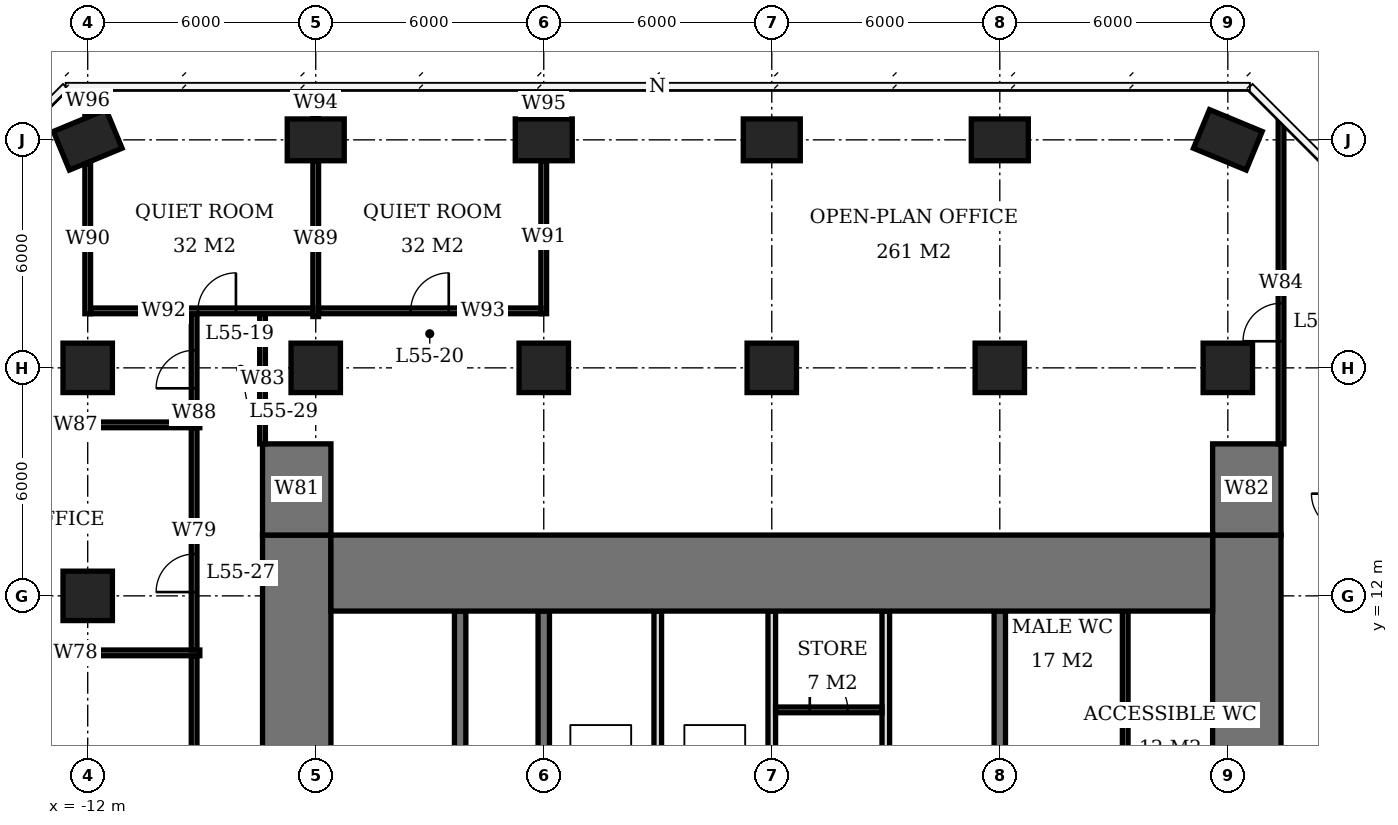
"""IFC4 building model, lengths in metres.
Left out: names, types, materials, properties, quantities, classifications, styles, units other than length and angle.
Written with IfcOpenShell. Run it as: python <this file> out.ifc"""

import sys

from ifc_helpers import new_model, si_unit, direction, frame, frame_2d, origin, origin_2d, place, context, subcontext, project, spatial, rectangle, extrude, element, fill, save


model = new_model("IFC4")
c1 = context("Model", 3, precision=1e-05, world=origin(), true_north=direction((0.0, 1.0)))
c2 = subcontext(c1, "Body", "Model", "MODEL_VIEW")
j1 = project(units=[si_unit("LENGTHUNIT", "METRE"), si_unit("PLANEANGLEUNIT", "RADIAN")], contexts=[c1])
p1 = place(None, origin())
s1 = spatial("IfcSite", under=j1, at=p1, CompositionType="ELEMENT")
p2 = place(p1, origin())
s2 = spatial("IfcBuilding", under=s1, at=p2, CompositionType="ELEMENT")
p3 = place(p2, frame((0.0, 0.0, 224.0)))
s3 = spatial("IfcBuildingStorey", under=s2, at=p3, CompositionType="ELEMENT", Elevation=224.0)
for number, where, z_axis, x_axis in (
    (1, (-12.0, 12.0, 0.0), (0.0, 0.0, 1.0), (1.0, 0.0, 0.0)),
    (2, (-12.0, 18.0, 0.0), (0.0, 0.0, 1.0), (1.0, 0.0, 0.0)),
):
    element("IfcColumn", number, at=place(p3, frame(where, z_axis=z_axis, x_axis=x_axis)), inside=s3, PredefinedType="COLUMN", context=c2, shape_type="SweptSolid", body=[
        extrude(rectangle(XDim=1.3, YDim=1.3, at=origin_2d()), origin(), (0.0, 0.0, 1.0), 3.9),
    ])
p4 = place(p3, frame((-12.0, 24.0, 0.0), z_axis=(0.0, 0.0, 1.0), x_axis=(0.923879532511, 0.382683432365, 0.0)))
e3 = element("IfcColumn", 3, at=p4, inside=s3, PredefinedType="COLUMN", context=c2, shape_type="SweptSolid", body=[
    extrude(rectangle(XDim=1.5, YDim=1.1, at=origin_2d()), origin(), (0.0, 0.0, 1.0), 3.9),
])
p5 = place(p3, frame((-6.0, 18.0, 0.0), z_axis=(0.0, 0.0, 1.0), x_axis=(1.0, 0.0, 0.0)))
e4 = element("IfcColumn", 4, at=p5, inside=s3, PredefinedType="COLUMN", context=c2, shape_type="SweptSolid", body=[
    extrude(rectangle(XDim=1.3, YDim=1.3, at=origin_2d()), origin(), (0.0, 0.0, 1.0), 3.9),
])
p6 = place(p3, frame((-6.0, 24.0, 0.0), z_axis=(0.0, 0.0, 1.0), x_axis=(1.0, 0.0, 0.0)))
e5 = element("IfcColumn", 5, at=p6, inside=s3, PredefinedType="COLUMN", context=c2, shape_type="SweptSolid", body=[
    extrude(rectangle(XDim=1.5, YDim=1.1, at=origin_2d()), origin(), (0.0, 0.0, 1.0), 3.9),
])
p7 = place(p3, frame((0.0, 18.0, 0.0), z_axis=(0.0, 0.0, 1.0), x_axis=(1.0, 0.0, 0.0)))
e6 = element("IfcColumn", 6, at=p7, inside=s3, PredefinedType="COLUMN", context=c2, shape_type="SweptSolid", body=[
    extrude(rectangle(XDim=1.3, YDim=1.3, at=origin_2d()), origin(), (0.0, 0.0, 1.0), 3.9),
])
p8 = place(p3, frame((0.0, 24.0, 0.0), z_axis=(0.0, 0.0, 1.0), x_axis=(1.0, 0.0, 0.0)))
e7 = element("IfcColumn", 7, at=p8, inside=s3, PredefinedType="COLUMN", context=c2, shape_type="SweptSolid", body=[
    extrude(rectangle(XDim=1.5, YDim=1.1, at=origin_2d()), origin(), (0.0, 0.0, 1.0), 3.9),
])
p9 = place(p3, frame((6.0, 18.0, 0.0), z_axis=(0.0, 0.0, 1.0), x_axis=(1.0, 0.0, 0.0)))
e8 = element("IfcColumn", 8, at=p9, inside=s3, PredefinedType="COLUMN", context=c2, shape_type="SweptSolid", body=[
    extrude(rectangle(XDim=1.3, YDim=1.3, at=origin_2d()), origin(), (0.0, 0.0, 1.0), 3.9),
])
p10 = place(p3, frame((6.0, 24.0, 0.0), z_axis=(0.0, 0.0, 1.0), x_axis=(1.0, 0.0, 0.0)))
e9 = element("IfcColumn", 9, at=p10, inside=s3, PredefinedType="COLUMN", context=c2, shape_type="SweptSolid", body=[
    extrude(rectangle(XDim=1.5, YDim=1.1, at=origin_2d()), origin(), (0.0, 0.0, 1.0), 3.9),
])
p11 = place(p3, frame((12.0, 18.0, 0.0), z_axis=(0.0, 0.0, 1.0), x_axis=(1.0, 0.0, 0.0)))
e10 = element("IfcColumn", 10, at=p11, inside=s3, PredefinedType="COLUMN", context=c2, shape_type="SweptSolid", body=[
    extrude(rectangle(XDim=1.3, YDim=1.3, at=origin_2d()), origin(), (0.0, 0.0, 1.0), 3.9),
])
p12 = place(p3, frame((12.0, 24.0, 0.0), z_axis=(0.0, 0.0, 1.0), x_axis=(1.0, 0.0, 0.0)))
e11 = element("IfcColumn", 11, at=p12, inside=s3, PredefinedType="COLUMN", context=c2, shape_type="SweptSolid", body=[
    extrude(rectangle(XDim=1.5, YDim=1.1, at=origin_2d()), origin(), (0.0, 0.0, 1.0), 3.9),
])
p13 = place(p3, frame((18.0, 18.0, 0.0), z_axis=(0.0, 0.0, 1.0), x_axis=(1.0, 0.0, 0.0)))
e12 = element("IfcColumn", 12, at=p13, inside=s3, PredefinedType="COLUMN", context=c2, shape_type="SweptSolid", body=[
    extrude(rectangle(XDim=1.3, YDim=1.3, at=origin_2d()), origin(), (0.0, 0.0, 1.0), 3.9),
])
p14 = place(p3, frame((18.0, 24.0, 0.0), z_axis=(0.0, 0.0, 1.0), x_axis=(0.923879532511, -0.382683432365, 0.0)))
e13 = element("IfcColumn", 13, at=p14, inside=s3, PredefinedType="COLUMN", context=c2, shape_type="SweptSolid", body=[
    extrude(rectangle(XDim=1.5, YDim=1.1, at=origin_2d()), origin(), (0.0, 0.0, 1.0), 3.9),
])
p15 = place(p3, frame((-5.6, 12.6, 0.0), z_axis=(0.0, 0.0, 1.0), x_axis=(1.0, 0.0, 0.0)))
e14 = element("IfcWall", 14, at=p15, inside=s3, PredefinedType="SHEAR", context=c2, shape_type="SweptSolid", body=[
    extrude(rectangle(XDim=23.2, YDim=2.0, at=frame_2d((11.6, 0.0))), origin(), (0.0, 0.0, 1.0), 3.9),
])
p16 = place(p3, frame((-6.5, -7.6, 0.0), z_axis=(0.0, 0.0, 1.0), x_axis=(0.0, 1.0, 0.0)))
e15 = element("IfcWall", 15, at=p16, inside=s3, PredefinedType="SHEAR", context=c2, shape_type="SweptSolid", body=[
    extrude(rectangle(XDim=21.2, YDim=1.8, at=frame_2d((10.6, 0.0))), origin(), (0.0, 0.0, 1.0), 3.9),
])
p17 = place(p16, frame((7.8, 0.0, 0.0)))
e16 = element("IfcOpeningElement", 16, at=p17, cuts=e15, PredefinedType="OPENING", context=c2, shape_type="SweptSolid", body=[
    extrude(rectangle(XDim=1.8, YDim=2.4, at=frame_2d((0.9, 1.2))), frame((0.0, 0.91, 0.0), z_axis=(0.0, -1.0, 0.0), x_axis=(1.0, 0.0, 0.0)), (0.0, 0.0, 1.0), 1.82),
])
p18 = place(p3, frame((18.5, -7.6, 0.0), z_axis=(0.0, 0.0, 1.0), x_axis=(0.0, 1.0, 0.0)))
e17 = element("IfcWall", 17, at=p18, inside=s3, PredefinedType="SHEAR", context=c2, shape_type="SweptSolid", body=[
    extrude(rectangle(XDim=21.2, YDim=1.8, at=frame_2d((10.6, 0.0))), origin(), (0.0, 0.0, 1.0), 3.9),
])
p19 = place(p18, frame((9.2, 0.0, 0.0)))
e18 = element("IfcOpeningElement", 18, at=p19, cuts=e17, PredefinedType="OPENING", context=c2, shape_type="SweptSolid", body=[
    extrude(rectangle(XDim=1.8, YDim=2.4, at=frame_2d((0.9, 1.2))), frame((0.0, 0.91, 0.0), z_axis=(0.0, -1.0, 0.0), x_axis=(1.0, 0.0, 0.0)), (0.0, 0.0, 1.0), 1.82),
])
for number, where, z_axis, x_axis in (
    (19, (-6.5, 13.6, 0.0), (0.0, 0.0, 1.0), (0.0, 1.0, 0.0)),
    (20, (18.5, 13.6, 0.0), (0.0, 0.0, 1.0), (0.0, 1.0, 0.0)),
):
    element("IfcWall", number, at=place(p3, frame(where, z_axis=z_axis, x_axis=x_axis)), inside=s3, PredefinedType="SHEAR", context=c2, shape_type="SweptSolid", body=[
        extrude(rectangle(XDim=2.4, YDim=1.8, at=frame_2d((1.2, 0.0))), origin(), (0.0, 0.0, 1.0), 3.9),
    ])
p20 = place(p3, frame((0.0, 3.15, 0.0), z_axis=(0.0, 0.0, 1.0), x_axis=(0.0, 1.0, 0.0)))
e21 = element("IfcWall", 21, at=p20, inside=s3, PredefinedType="SHEAR", context=c2, shape_type="SweptSolid", body=[
    extrude(rectangle(XDim=8.45, YDim=0.3, at=frame_2d((4.225, 0.0))), origin(), (0.0, 0.0, 1.0), 3.9),
])
p21 = place(p3, frame((12.0, 6.15, 0.0), z_axis=(0.0, 0.0, 1.0), x_axis=(0.0, 1.0, 0.0)))
e22 = element("IfcWall", 22, at=p21, inside=s3, PredefinedType="SHEAR", context=c2, shape_type="SweptSolid", body=[
    extrude(rectangle(XDim=5.45, YDim=0.3, at=frame_2d((2.725, 0.0))), origin(), (0.0, 0.0, 1.0), 3.9),
])
p22 = place(p3, frame((-2.2, 3.15, 0.0), z_axis=(0.0, 0.0, 1.0), x_axis=(0.0, 1.0, 0.0)))
e23 = element("IfcWall", 23, at=p22, inside=s3, PredefinedType="SHEAR", context=c2, shape_type="SweptSolid", body=[
    extrude(rectangle(XDim=8.45, YDim=0.3, at=frame_2d((4.225, 0.0))), origin(), (0.0, 0.0, 1.0), 3.9),
])
for number, where, z_axis, x_axis in (
    (24, (3.0, 6.15, 0.0), (0.0, 0.0, 1.0), (0.0, 1.0, 0.0)),
    (25, (6.0, 6.15, 0.0), (0.0, 0.0, 1.0), (0.0, 1.0, 0.0)),
    (26, (9.0, 6.15, 0.0), (0.0, 0.0, 1.0), (0.0, 1.0, 0.0)),
):
    element("IfcWall", number, at=place(p3, frame(where, z_axis=z_axis, x_axis=x_axis)), inside=s3, PredefinedType="SOLIDWALL", context=c2, shape_type="SweptSolid", body=[
        extrude(rectangle(XDim=5.45, YDim=0.2, at=frame_2d((2.725, 0.0))), origin(), (0.0, 0.0, 1.0), 3.9),
    ])
p23 = place(p3, frame((15.3, 6.15, 0.0), z_axis=(0.0, 0.0, 1.0), x_axis=(0.0, 1.0, 0.0)))
e27 = element("IfcWall", 27, at=p23, inside=s3, PredefinedType="PLUMBINGWALL", context=c2, shape_type="SweptSolid", body=[
    extrude(rectangle(XDim=5.45, YDim=0.15, at=frame_2d((2.725, 0.0))), origin(), (0.0, 0.0, 1.0), 3.65),
])
p24 = place(p3, frame((6.1, 9.0, 0.0), z_axis=(0.0, 0.0, 1.0), x_axis=(1.0, 0.0, 0.0)))
e28 = element("IfcWall", 28, at=p24, inside=s3, PredefinedType="PARTITIONING", context=c2, shape_type="SweptSolid", body=[
    extrude(rectangle(XDim=2.8, YDim=0.15, at=frame_2d((1.4, 0.0))), origin(), (0.0, 0.0, 1.0), 3.65),
])
p25 = place(p24, frame((0.9, 0.0, 0.0)))
e29 = element("IfcOpeningElement", 29, at=p25, cuts=e28, PredefinedType="OPENING", context=c2, shape_type="SweptSolid", body=[
    extrude(rectangle(XDim=1.0, YDim=2.1, at=frame_2d((0.5, 1.05))), frame((0.0, 0.085, 0.0), z_axis=(0.0, -1.0, 0.0), x_axis=(1.0, 0.0, 0.0)), (0.0, 0.0, 1.0), 0.17),
])
p26 = place(p3, frame((-11.925, 19.5, 0.0), z_axis=(0.0, 0.0, 1.0), x_axis=(1.0, 0.0, 0.0)))
e30 = element("IfcWall", 30, at=p26, inside=s3, PredefinedType="PARTITIONING", context=c2, shape_type="SweptSolid", body=[
    extrude(rectangle(XDim=5.85, YDim=0.15, at=frame_2d((2.925, 0.0))), origin(), (0.0, 0.0, 1.0), 3.65),
])
p27 = place(p26, frame((2.825, 0.0, 0.0)))
e31 = element("IfcOpeningElement", 31, at=p27, cuts=e30, PredefinedType="OPENING", context=c2, shape_type="SweptSolid", body=[
    extrude(rectangle(XDim=1.0, YDim=2.1, at=frame_2d((0.5, 1.05))), frame((0.0, 0.085, 0.0), z_axis=(0.0, -1.0, 0.0), x_axis=(1.0, 0.0, 0.0)), (0.0, 0.0, 1.0), 0.17),
])
p28 = place(p3, frame((-5.925, 19.5, 0.0), z_axis=(0.0, 0.0, 1.0), x_axis=(1.0, 0.0, 0.0)))
e32 = element("IfcWall", 32, at=p28, inside=s3, PredefinedType="PARTITIONING", context=c2, shape_type="SweptSolid", body=[
    extrude(rectangle(XDim=5.85, YDim=0.15, at=frame_2d((2.925, 0.0))), origin(), (0.0, 0.0, 1.0), 3.65),
])
p29 = place(p28, frame((2.425, 0.0, 0.0)))
e33 = element("IfcOpeningElement", 33, at=p29, cuts=e32, PredefinedType="OPENING", context=c2, shape_type="SweptSolid", body=[
    extrude(rectangle(XDim=1.0, YDim=2.1, at=frame_2d((0.5, 1.05))), frame((0.0, 0.085, 0.0), z_axis=(0.0, -1.0, 0.0), x_axis=(1.0, 0.0, 0.0)), (0.0, 0.0, 1.0), 0.17),
])
p30 = place(p3, frame((-12.0, 19.425, 0.0), z_axis=(0.0, 0.0, 1.0), x_axis=(0.0, 1.0, 0.0)))
e34 = element("IfcWall", 34, at=p30, inside=s3, PredefinedType="PARTITIONING", context=c2, shape_type="SweptSolid", body=[
    extrude(rectangle(XDim=3.948, YDim=0.15, at=frame_2d((1.974, 0.0))), origin(), (0.0, 0.0, 1.0), 3.65),
])
p31 = place(p3, frame((-12.0, 24.626, 0.0), z_axis=(0.0, 0.0, 1.0), x_axis=(0.0, 1.0, 0.0)))
e35 = element("IfcWall", 35, at=p31, inside=s3, PredefinedType="PARTITIONING", context=c2, shape_type="SweptSolid", body=[
    extrude(rectangle(XDim=0.773, YDim=0.15, at=frame_2d((0.387, 0.0))), origin(), (0.0, 0.0, 1.0), 3.65),
])
p32 = place(p3, frame((-6.0, 19.35, 0.0), z_axis=(0.0, 0.0, 1.0), x_axis=(0.0, 1.0, 0.0)))
e36 = element("IfcWall", 36, at=p32, inside=s3, PredefinedType="PARTITIONING", context=c2, shape_type="SweptSolid", body=[
    extrude(rectangle(XDim=4.1, YDim=0.15, at=frame_2d((2.05, 0.0))), origin(), (0.0, 0.0, 1.0), 3.65),
])
p33 = place(p3, frame((-6.0, 24.55, 0.0), z_axis=(0.0, 0.0, 1.0), x_axis=(0.0, 1.0, 0.0)))
e37 = element("IfcWall", 37, at=p33, inside=s3, PredefinedType="PARTITIONING", context=c2, shape_type="SweptSolid", body=[
    extrude(rectangle(XDim=0.85, YDim=0.15, at=frame_2d((0.425, 0.0))), origin(), (0.0, 0.0, 1.0), 3.65),
])
p34 = place(p3, frame((0.0, 19.425, 0.0), z_axis=(0.0, 0.0, 1.0), x_axis=(0.0, 1.0, 0.0)))
e38 = element("IfcWall", 38, at=p34, inside=s3, PredefinedType="PARTITIONING", context=c2, shape_type="SweptSolid", body=[
    extrude(rectangle(XDim=4.025, YDim=0.15, at=frame_2d((2.012, 0.0))), origin(), (0.0, 0.0, 1.0), 3.65),
])
p35 = place(p3, frame((0.0, 24.55, 0.0), z_axis=(0.0, 0.0, 1.0), x_axis=(0.0, 1.0, 0.0)))
e39 = element("IfcWall", 39, at=p35, inside=s3, PredefinedType="PARTITIONING", context=c2, shape_type="SweptSolid", body=[
    extrude(rectangle(XDim=0.8, YDim=0.15, at=frame_2d((0.4, 0.0))), origin(), (0.0, 0.0, 1.0), 3.65),
])
for number, where, z_axis, x_axis in (
    (40, (-15.59, 10.5, 0.0), (0.0, 0.0, 1.0), (1.0, 0.0, 0.0)),
    (41, (-15.59, 16.5, 0.0), (0.0, 0.0, 1.0), (1.0, 0.0, 0.0)),
):
    element("IfcWall", number, at=place(p3, frame(where, z_axis=z_axis, x_axis=x_axis)), inside=s3, PredefinedType="PARTITIONING", context=c2, shape_type="SweptSolid", body=[
        extrude(rectangle(XDim=6.54, YDim=0.15, at=frame_2d((3.27, 0.0))), origin(), (0.0, 0.0, 1.0), 3.65),
    ])
p36 = place(p3, frame((-9.2, -4.425, 0.0), z_axis=(0.0, 0.0, 1.0), x_axis=(0.0, 1.0, 0.0)))
e42 = element("IfcWall", 42, at=p36, inside=s3, PredefinedType="PARTITIONING", context=c2, shape_type="SweptSolid", body=[
    extrude(rectangle(XDim=14.85, YDim=0.15, at=frame_2d((7.425, 0.0))), origin(), (0.0, 0.0, 1.0), 3.65),
])
p37 = place(p36, frame((4.675, 0.0, 0.0)))
e43 = element("IfcOpeningElement", 43, at=p37, cuts=e42, PredefinedType="OPENING", context=c2, shape_type="SweptSolid", body=[
    extrude(rectangle(XDim=1.0, YDim=2.1, at=frame_2d((0.5, 1.05))), frame((0.0, 0.085, 0.0), z_axis=(0.0, -1.0, 0.0), x_axis=(1.0, 0.0, 0.0)), (0.0, 0.0, 1.0), 0.17),
])
p38 = place(p3, frame((-9.2, 10.575, 0.0), z_axis=(0.0, 0.0, 1.0), x_axis=(0.0, 1.0, 0.0)))
e44 = element("IfcWall", 44, at=p38, inside=s3, PredefinedType="PARTITIONING", context=c2, shape_type="SweptSolid", body=[
    extrude(rectangle(XDim=5.85, YDim=0.15, at=frame_2d((2.925, 0.0))), origin(), (0.0, 0.0, 1.0), 3.65),
])
p39 = place(p38, frame((1.525, 0.0, 0.0)))
e45 = element("IfcOpeningElement", 45, at=p39, cuts=e44, PredefinedType="OPENING", context=c2, shape_type="SweptSolid", body=[
    extrude(rectangle(XDim=1.0, YDim=2.1, at=frame_2d((0.5, 1.05))), frame((0.0, 0.085, 0.0), z_axis=(0.0, -1.0, 0.0), x_axis=(1.0, 0.0, 0.0)), (0.0, 0.0, 1.0), 0.17),
])
p40 = place(p3, frame((-9.2, 16.575, 0.0), z_axis=(0.0, 0.0, 1.0), x_axis=(0.0, 1.0, 0.0)))
e46 = element("IfcWall", 46, at=p40, inside=s3, PredefinedType="PARTITIONING", context=c2, shape_type="SweptSolid", body=[
    extrude(rectangle(XDim=2.85, YDim=0.15, at=frame_2d((1.425, 0.0))), origin(), (0.0, 0.0, 1.0), 3.65),
])
p41 = place(p40, frame((0.887, 0.0, 0.0)))
e47 = element("IfcOpeningElement", 47, at=p41, cuts=e46, PredefinedType="OPENING", context=c2, shape_type="SweptSolid", body=[
    extrude(rectangle(XDim=1.0, YDim=2.1, at=frame_2d((0.5, 1.05))), frame((0.0, 0.085, 0.0), z_axis=(0.0, -1.0, 0.0), x_axis=(1.0, 0.0, 0.0)), (0.0, 0.0, 1.0), 0.17),
])
p42 = place(p3, frame((-7.4, 16.0, 0.0), z_axis=(0.0, 0.0, 1.0), x_axis=(0.0, 1.0, 0.0)))
e48 = element("IfcWall", 48, at=p42, inside=s3, PredefinedType="PARTITIONING", context=c2, shape_type="SweptSolid", body=[
    extrude(rectangle(XDim=3.425, YDim=0.15, at=frame_2d((1.712, 0.0))), origin(), (0.0, 0.0, 1.0), 3.65),
])
p43 = place(p3, frame((19.4, 16.0, 0.0), z_axis=(0.0, 0.0, 1.0), x_axis=(0.0, 1.0, 0.0)))
e49 = element("IfcWall", 49, at=p43, inside=s3, PredefinedType="PARTITIONING", context=c2, shape_type="SweptSolid", body=[
    extrude(rectangle(XDim=8.489, YDim=0.15, at=frame_2d((4.245, 0.0))), origin(), (0.0, 0.0, 1.0), 3.65),
])
p44 = place(p43, frame((2.7, 0.0, 0.0)))
e50 = element("IfcOpeningElement", 50, at=p44, cuts=e49, PredefinedType="OPENING", context=c2, shape_type="SweptSolid", body=[
    extrude(rectangle(XDim=1.0, YDim=2.1, at=frame_2d((0.5, 1.05))), frame((0.0, 0.085, 0.0), z_axis=(0.0, -1.0, 0.0), x_axis=(1.0, 0.0, 0.0)), (0.0, 0.0, 1.0), 0.17),
])
p45 = place(p25, origin())
e51 = element("IfcDoor", 51, at=p45, inside=s3, OperationType="SINGLE_SWING_LEFT", PredefinedType="DOOR", context=c2, shape_type="SweptSolid", body=[
    extrude(rectangle(XDim=1.0, YDim=2.1, at=frame_2d((0.5, 1.05))), frame((0.0, 0.025, 0.0), z_axis=(0.0, -1.0, 0.0), x_axis=(1.0, 0.0, 0.0)), (0.0, 0.0, 1.0), 0.05),
])
fill(e29, e51)
p46 = place(p27, origin())
e52 = element("IfcDoor", 52, at=p46, inside=s3, OperationType="SINGLE_SWING_RIGHT", PredefinedType="DOOR", context=c2, shape_type="SweptSolid", body=[
    extrude(rectangle(XDim=1.0, YDim=2.1, at=frame_2d((0.5, 1.05))), frame((0.0, 0.025, 0.0), z_axis=(0.0, -1.0, 0.0), x_axis=(1.0, 0.0, 0.0)), (0.0, 0.0, 1.0), 0.05),
])
fill(e31, e52)
p47 = place(p29, origin())
e53 = element("IfcDoor", 53, at=p47, inside=s3, OperationType="SINGLE_SWING_RIGHT", PredefinedType="DOOR", context=c2, shape_type="SweptSolid", body=[
    extrude(rectangle(XDim=1.0, YDim=2.1, at=frame_2d((0.5, 1.05))), frame((0.0, 0.025, 0.0), z_axis=(0.0, -1.0, 0.0), x_axis=(1.0, 0.0, 0.0)), (0.0, 0.0, 1.0), 0.05),
])
fill(e33, e53)
p48 = place(p39, origin())
e54 = element("IfcDoor", 54, at=p48, inside=s3, OperationType="SINGLE_SWING_LEFT", PredefinedType="DOOR", context=c2, shape_type="SweptSolid", body=[
    extrude(rectangle(XDim=1.0, YDim=2.1, at=frame_2d((0.5, 1.05))), frame((0.0, 0.025, 0.0), z_axis=(0.0, -1.0, 0.0), x_axis=(1.0, 0.0, 0.0)), (0.0, 0.0, 1.0), 0.05),
])
fill(e45, e54)
p49 = place(p44, origin())
e55 = element("IfcDoor", 55, at=p49, inside=s3, OperationType="SINGLE_SWING_LEFT", PredefinedType="DOOR", context=c2, shape_type="SweptSolid", body=[
    extrude(rectangle(XDim=1.0, YDim=2.1, at=frame_2d((0.5, 1.05))), frame((0.0, 0.025, 0.0), z_axis=(0.0, -1.0, 0.0), x_axis=(1.0, 0.0, 0.0)), (0.0, 0.0, 1.0), 0.05),
])
fill(e50, e55)
p50 = place(p41, origin())
e56 = element("IfcDoor", 56, at=p50, inside=s3, OperationType="SINGLE_SWING_LEFT", PredefinedType="DOOR", context=c2, shape_type="SweptSolid", body=[
    extrude(rectangle(XDim=1.0, YDim=2.1, at=frame_2d((0.5, 1.05))), frame((0.0, 0.025, 0.0), z_axis=(0.0, -1.0, 0.0), x_axis=(1.0, 0.0, 0.0)), (0.0, 0.0, 1.0), 0.05),
])
fill(e47, e56)
save(model, sys.argv[1])
